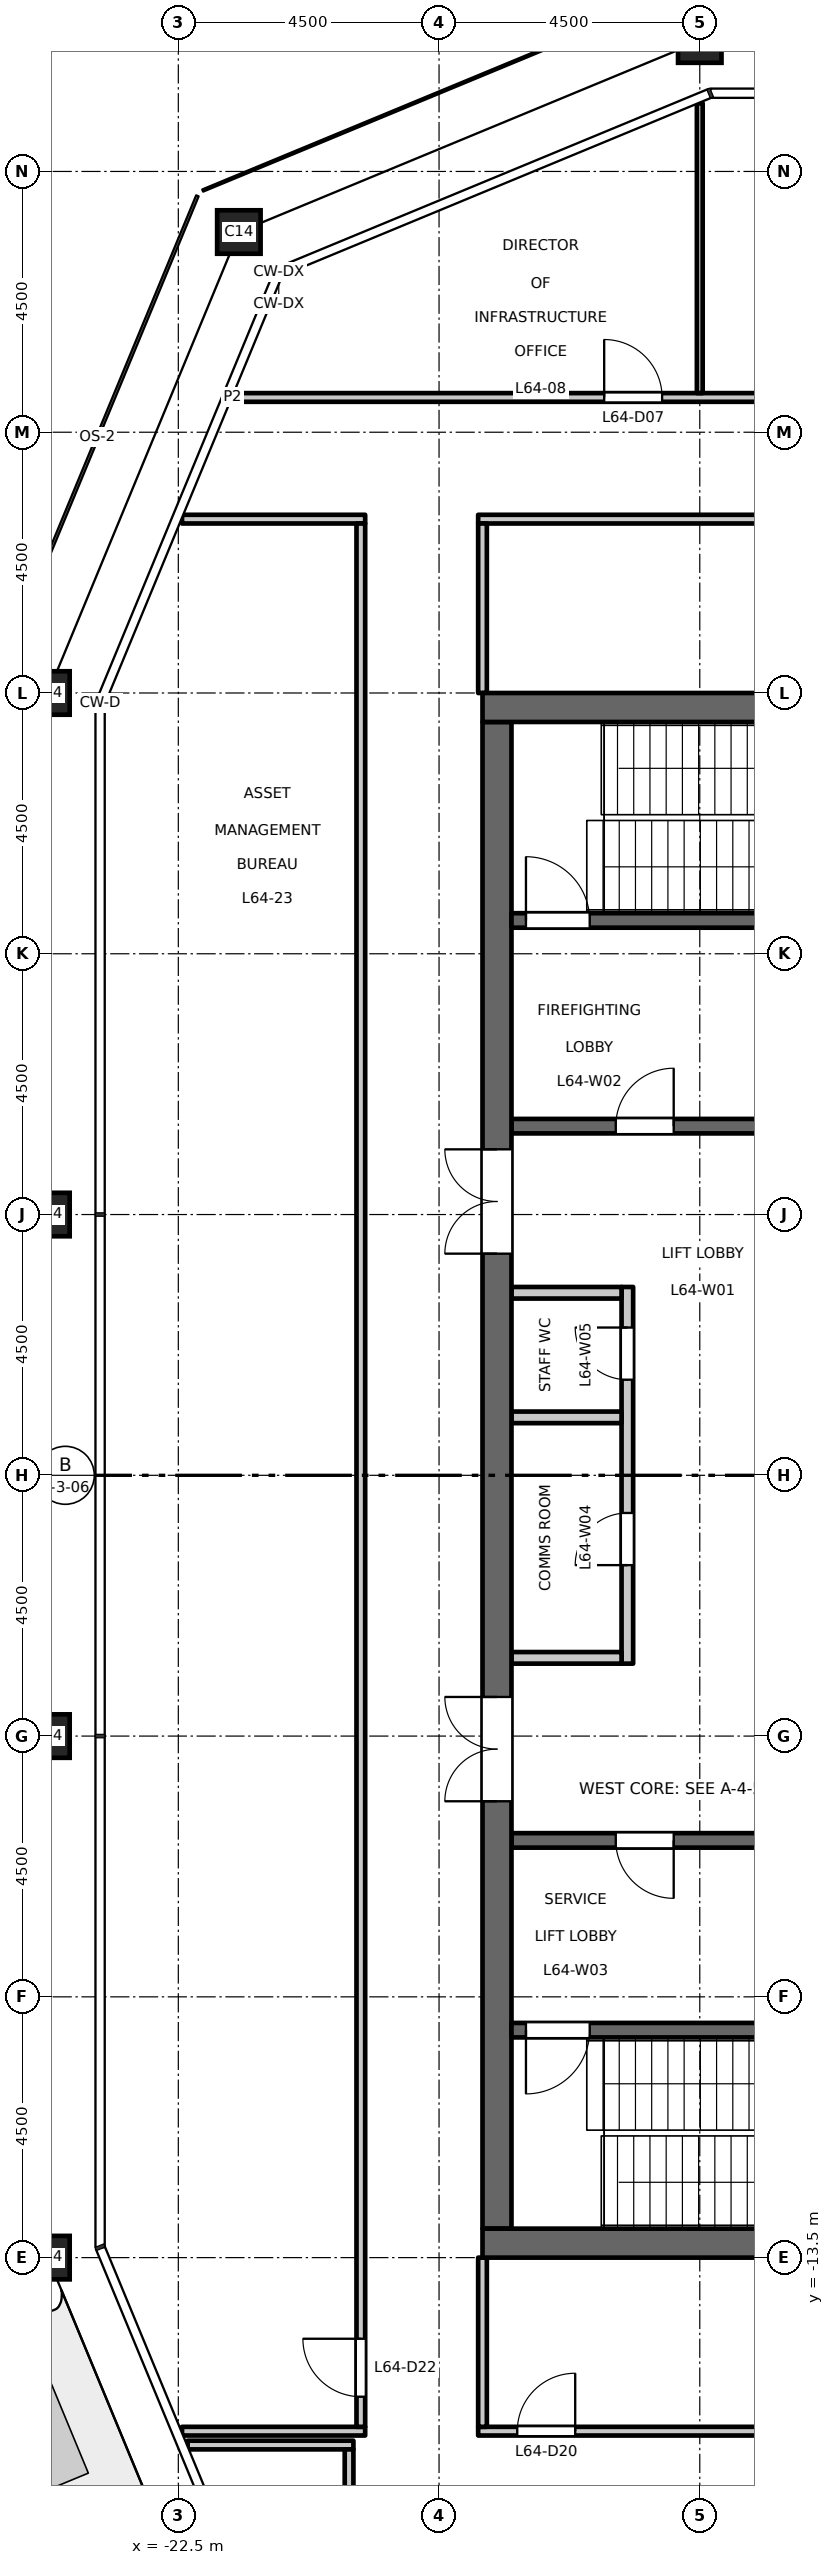
"""IFC4 building model, lengths in metres.
Left out: names, types, materials, properties, quantities, classifications, styles, units other than length and angle.
Written with IfcOpenShell. Run it as: python <this file> out.ifc"""

import sys

from ifc_helpers import new_model, si_unit, direction, frame, frame_2d, origin, origin_2d, place, context, subcontext, project, spatial, rectangle, hollow_rectangle, extrude, element, fill, save


model = new_model("IFC4")
c1 = context("Model", 3, precision=1e-05, world=origin(), true_north=direction((0.0, 1.0)))
c2 = subcontext(c1, "Body", "Model", "MODEL_VIEW")
j1 = project(units=[si_unit("LENGTHUNIT", "METRE"), si_unit("PLANEANGLEUNIT", "RADIAN")], contexts=[c1])
p1 = place(None, origin())
s1 = spatial("IfcSite", under=j1, at=p1, CompositionType="ELEMENT")
p2 = place(p1, origin())
s2 = spatial("IfcBuilding", under=s1, at=p2, CompositionType="ELEMENT")
p3 = place(p2, frame((0.0, 0.0, 298.7)))
s3 = spatial("IfcBuildingStorey", under=s2, at=p3, CompositionType="ELEMENT", Elevation=298.7)
for number, where, z_axis, x_axis in (
    (1, (-13.5, 24.75, 0.0), (0.0, 0.0, 1.0), (1.0, 0.0, 0.0)),
    (2, (-21.455, 21.455, 0.0), (0.0, 0.0, 1.0), (1.0, 0.0, 0.0)),
    (3, (-24.75, 13.5, 0.0), (0.0, 0.0, 1.0), (1.0, 0.0, 0.0)),
    (4, (-24.75, 4.5, 0.0), (0.0, 0.0, 1.0), (1.0, 0.0, 0.0)),
    (5, (-24.75, -4.5, 0.0), (0.0, 0.0, 1.0), (1.0, 0.0, 0.0)),
    (6, (-24.75, -13.5, 0.0), (0.0, 0.0, 1.0), (1.0, 0.0, 0.0)),
):
    element("IfcColumn", number, at=place(p3, frame(where, z_axis=z_axis, x_axis=x_axis)), inside=s3, PredefinedType="COLUMN", context=c2, shape_type="SweptSolid", body=[
        extrude(hollow_rectangle(XDim=0.75, YDim=0.75, WallThickness=0.04, at=origin_2d()), origin(), (0.0, 0.0, 1.0), 4.5),
    ])
p4 = place(p3, frame((-14.75, -3.25, 0.0), z_axis=(0.0, 0.0, 1.0), x_axis=(0.0, 1.0, 0.0)))
e7 = element("IfcWall", 7, at=p4, inside=s3, PredefinedType="PARTITIONING", context=c2, shape_type="SweptSolid", body=[
    extrude(rectangle(XDim=6.5, YDim=0.2, at=frame_2d((3.25, 0.0))), origin(), (0.0, 0.0, 1.0), 4.35),
])
p5 = place(p4, frame((1.7, 0.0, 0.0)))
e8 = element("IfcOpeningElement", 8, at=p5, cuts=e7, PredefinedType="OPENING", context=c2, shape_type="SweptSolid", body=[
    extrude(rectangle(XDim=0.9, YDim=2.1, at=frame_2d((0.45, 1.05))), frame((0.0, 0.11, 0.0), z_axis=(0.0, -1.0, 0.0), x_axis=(1.0, 0.0, 0.0)), (0.0, 0.0, 1.0), 0.22),
])
p6 = place(p4, frame((4.9, 0.0, 0.0)))
e9 = element("IfcOpeningElement", 9, at=p6, cuts=e7, PredefinedType="OPENING", context=c2, shape_type="SweptSolid", body=[
    extrude(rectangle(XDim=0.9, YDim=2.1, at=frame_2d((0.45, 1.05))), frame((0.0, 0.11, 0.0), z_axis=(0.0, -1.0, 0.0), x_axis=(1.0, 0.0, 0.0)), (0.0, 0.0, 1.0), 0.22),
])
for number, where, z_axis, x_axis in (
    (10, (-14.85, 3.15, 0.0), (0.0, 0.0, 1.0), (-1.0, 0.0, 0.0)),
    (11, (-14.85, -3.15, 0.0), (0.0, 0.0, 1.0), (-1.0, 0.0, 0.0)),
    (12, (-14.85, 1.0, 0.0), (0.0, 0.0, 1.0), (-1.0, 0.0, 0.0)),
):
    element("IfcWall", number, at=place(p3, frame(where, z_axis=z_axis, x_axis=x_axis)), inside=s3, PredefinedType="PARTITIONING", context=c2, shape_type="SweptSolid", body=[
        extrude(rectangle(XDim=1.9, YDim=0.2, at=frame_2d((0.95, 0.0))), origin(), (0.0, 0.0, 1.0), 4.35),
    ])
p7 = place(p3, frame((-12.15, 6.025, 0.0), z_axis=(0.0, 0.0, 1.0), x_axis=(-1.0, 0.0, 0.0)))
e13 = element("IfcWall", 13, at=p7, inside=s3, PredefinedType="SHEAR", context=c2, shape_type="SweptSolid", body=[
    extrude(rectangle(XDim=4.6, YDim=0.25, at=frame_2d((2.3, 0.0))), origin(), (0.0, 0.0, 1.0), 4.35),
])
p8 = place(p7, frame((1.8, 0.0, 0.0)))
e14 = element("IfcOpeningElement", 14, at=p8, cuts=e13, PredefinedType="OPENING", context=c2, shape_type="SweptSolid", body=[
    extrude(rectangle(XDim=1.0, YDim=2.1, at=frame_2d((0.5, 1.05))), frame((0.0, 0.135, 0.0), z_axis=(0.0, -1.0, 0.0), x_axis=(1.0, 0.0, 0.0)), (0.0, 0.0, 1.0), 0.27),
])
p9 = place(p3, frame((-12.15, -6.3, 0.0), z_axis=(0.0, 0.0, 1.0), x_axis=(-1.0, 0.0, 0.0)))
e15 = element("IfcWall", 15, at=p9, inside=s3, PredefinedType="SHEAR", context=c2, shape_type="SweptSolid", body=[
    extrude(rectangle(XDim=4.6, YDim=0.25, at=frame_2d((2.3, 0.0))), origin(), (0.0, 0.0, 1.0), 4.35),
])
p10 = place(p9, frame((1.8, 0.0, 0.0)))
e16 = element("IfcOpeningElement", 16, at=p10, cuts=e15, PredefinedType="OPENING", context=c2, shape_type="SweptSolid", body=[
    extrude(rectangle(XDim=1.0, YDim=2.1, at=frame_2d((0.5, 1.05))), frame((0.0, 0.135, 0.0), z_axis=(0.0, -1.0, 0.0), x_axis=(1.0, 0.0, 0.0)), (0.0, 0.0, 1.0), 0.27),
])
p11 = place(p3, frame((-17.0, -13.0, 0.0), z_axis=(0.0, 0.0, 1.0), x_axis=(0.0, 1.0, 0.0)))
e17 = element("IfcWall", 17, at=p11, inside=s3, PredefinedType="SHEAR", context=c2, shape_type="SweptSolid", body=[
    extrude(rectangle(XDim=26.0, YDim=0.5, at=frame_2d((13.0, 0.0))), origin(), (0.0, 0.0, 1.0), 4.35),
])
p12 = place(p11, frame((16.825, 0.0, 0.0)))
e18 = element("IfcOpeningElement", 18, at=p12, cuts=e17, PredefinedType="OPENING", context=c2, shape_type="SweptSolid", body=[
    extrude(rectangle(XDim=1.8, YDim=2.1, at=frame_2d((0.9, 1.05))), frame((0.0, 0.26, 0.0), z_axis=(0.0, -1.0, 0.0), x_axis=(1.0, 0.0, 0.0)), (0.0, 0.0, 1.0), 0.52),
])
p13 = place(p11, frame((7.375, 0.0, 0.0)))
e19 = element("IfcOpeningElement", 19, at=p13, cuts=e17, PredefinedType="OPENING", context=c2, shape_type="SweptSolid", body=[
    extrude(rectangle(XDim=1.8, YDim=2.1, at=frame_2d((0.9, 1.05))), frame((0.0, 0.26, 0.0), z_axis=(0.0, -1.0, 0.0), x_axis=(1.0, 0.0, 0.0)), (0.0, 0.0, 1.0), 0.52),
])
p14 = place(p3, frame((-8.75, 9.575, 0.0), z_axis=(0.0, 0.0, 1.0), x_axis=(-1.0, 0.0, 0.0)))
e20 = element("IfcWall", 20, at=p14, inside=s3, PredefinedType="SHEAR", context=c2, shape_type="SweptSolid", body=[
    extrude(rectangle(XDim=8.0, YDim=0.25, at=frame_2d((4.0, 0.0))), origin(), (0.0, 0.0, 1.0), 4.35),
])
p15 = place(p14, frame((6.65, 0.0, 0.0)))
e21 = element("IfcOpeningElement", 21, at=p15, cuts=e20, PredefinedType="OPENING", context=c2, shape_type="SweptSolid", body=[
    extrude(rectangle(XDim=1.1, YDim=2.1, at=frame_2d((0.55, 1.05))), frame((0.0, 0.135, 0.0), z_axis=(0.0, -1.0, 0.0), x_axis=(1.0, 0.0, 0.0)), (0.0, 0.0, 1.0), 0.27),
])
p16 = place(p3, frame((-8.75, -9.575, 0.0), z_axis=(0.0, 0.0, 1.0), x_axis=(-1.0, 0.0, 0.0)))
e22 = element("IfcWall", 22, at=p16, inside=s3, PredefinedType="SHEAR", context=c2, shape_type="SweptSolid", body=[
    extrude(rectangle(XDim=8.0, YDim=0.25, at=frame_2d((4.0, 0.0))), origin(), (0.0, 0.0, 1.0), 4.35),
])
p17 = place(p16, frame((6.65, 0.0, 0.0)))
e23 = element("IfcOpeningElement", 23, at=p17, cuts=e22, PredefinedType="OPENING", context=c2, shape_type="SweptSolid", body=[
    extrude(rectangle(XDim=1.1, YDim=2.1, at=frame_2d((0.55, 1.05))), frame((0.0, 0.135, 0.0), z_axis=(0.0, -1.0, 0.0), x_axis=(1.0, 0.0, 0.0)), (0.0, 0.0, 1.0), 0.27),
])
for number, where, z_axis, x_axis in (
    (24, (-8.25, 13.25, 0.0), (0.0, 0.0, 1.0), (-1.0, 0.0, 0.0)),
    (25, (-8.25, -13.25, 0.0), (0.0, 0.0, 1.0), (-1.0, 0.0, 0.0)),
):
    element("IfcWall", number, at=place(p3, frame(where, z_axis=z_axis, x_axis=x_axis)), inside=s3, PredefinedType="SHEAR", context=c2, shape_type="SweptSolid", body=[
        extrude(rectangle(XDim=9.0, YDim=0.5, at=frame_2d((4.5, 0.0))), origin(), (0.0, 0.0, 1.0), 4.35),
    ])
p18 = place(p3, frame((-22.339, -16.734, 0.0), z_axis=(0.0, 0.0, 1.0), x_axis=(1.0, 0.0, 0.0)))
e26 = element("IfcWall", 26, at=p18, inside=s3, PredefinedType="PARTITIONING", context=c2, shape_type="SweptSolid", body=[
    extrude(rectangle(XDim=2.861, YDim=0.15, at=frame_2d((1.431, 0.0))), origin(), (0.0, 0.0, 1.0), 4.35),
])
p19 = place(p3, frame((-22.436, -16.495, 0.0), z_axis=(0.0, 0.0, 1.0), x_axis=(1.0, 0.0, 0.0)))
e27 = element("IfcWall", 27, at=p19, inside=s3, PredefinedType="PARTITIONING", context=c2, shape_type="SweptSolid", body=[
    extrude(rectangle(XDim=3.161, YDim=0.15, at=frame_2d((1.581, 0.0))), origin(), (0.0, 0.0, 1.0), 4.35),
])
p20 = place(p3, frame((-17.325, -16.495, 0.0), z_axis=(0.0, 0.0, 1.0), x_axis=(1.0, 0.0, 0.0)))
e28 = element("IfcWall", 28, at=p20, inside=s3, PredefinedType="PARTITIONING", context=c2, shape_type="SweptSolid", body=[
    extrude(rectangle(XDim=34.65, YDim=0.15, at=frame_2d((17.325, 0.0))), origin(), (0.0, 0.0, 1.0), 4.35),
])
p21 = place(p20, frame((9.675, 0.0, 0.0)))
e29 = element("IfcOpeningElement", 29, at=p21, cuts=e28, PredefinedType="OPENING", context=c2, shape_type="SweptSolid", body=[
    extrude(rectangle(XDim=1.0, YDim=2.1, at=frame_2d((0.5, 1.05))), frame((0.0, 0.085, 0.0), z_axis=(0.0, -1.0, 0.0), x_axis=(1.0, 0.0, 0.0)), (0.0, 0.0, 1.0), 0.17),
])
p22 = place(p20, frame((23.925, 0.0, 0.0)))
e30 = element("IfcOpeningElement", 30, at=p22, cuts=e28, PredefinedType="OPENING", context=c2, shape_type="SweptSolid", body=[
    extrude(rectangle(XDim=1.0, YDim=2.1, at=frame_2d((0.5, 1.05))), frame((0.0, 0.085, 0.0), z_axis=(0.0, -1.0, 0.0), x_axis=(1.0, 0.0, 0.0)), (0.0, 0.0, 1.0), 0.17),
])
p23 = place(p20, frame((0.675, 0.0, 0.0)))
e31 = element("IfcOpeningElement", 31, at=p23, cuts=e28, PredefinedType="OPENING", context=c2, shape_type="SweptSolid", body=[
    extrude(rectangle(XDim=1.0, YDim=2.1, at=frame_2d((0.5, 1.05))), frame((0.0, 0.085, 0.0), z_axis=(0.0, -1.0, 0.0), x_axis=(1.0, 0.0, 0.0)), (0.0, 0.0, 1.0), 0.17),
])
p24 = place(p20, frame((32.925, 0.0, 0.0)))
e32 = element("IfcOpeningElement", 32, at=p24, cuts=e28, PredefinedType="OPENING", context=c2, shape_type="SweptSolid", body=[
    extrude(rectangle(XDim=1.0, YDim=2.1, at=frame_2d((0.5, 1.05))), frame((0.0, 0.085, 0.0), z_axis=(0.0, -1.0, 0.0), x_axis=(1.0, 0.0, 0.0)), (0.0, 0.0, 1.0), 0.17),
])
p25 = place(p3, frame((-22.436, 16.5, 0.0), z_axis=(0.0, 0.0, 1.0), x_axis=(1.0, 0.0, 0.0)))
e33 = element("IfcWall", 33, at=p25, inside=s3, PredefinedType="PARTITIONING", context=c2, shape_type="SweptSolid", body=[
    extrude(rectangle(XDim=3.161, YDim=0.15, at=frame_2d((1.581, 0.0))), origin(), (0.0, 0.0, 1.0), 4.35),
])
p26 = place(p3, frame((-17.325, 16.5, 0.0), z_axis=(0.0, 0.0, 1.0), x_axis=(1.0, 0.0, 0.0)))
e34 = element("IfcWall", 34, at=p26, inside=s3, PredefinedType="PARTITIONING", context=c2, shape_type="SweptSolid", body=[
    extrude(rectangle(XDim=34.65, YDim=0.15, at=frame_2d((17.325, 0.0))), origin(), (0.0, 0.0, 1.0), 4.35),
])
p27 = place(p26, frame((9.725, 0.0, 0.0)))
e35 = element("IfcOpeningElement", 35, at=p27, cuts=e34, PredefinedType="OPENING", context=c2, shape_type="SweptSolid", body=[
    extrude(rectangle(XDim=1.0, YDim=2.1, at=frame_2d((0.5, 1.05))), frame((0.0, 0.085, 0.0), z_axis=(0.0, -1.0, 0.0), x_axis=(1.0, 0.0, 0.0)), (0.0, 0.0, 1.0), 0.17),
])
p28 = place(p26, frame((7.475, 0.0, 0.0)))
e36 = element("IfcOpeningElement", 36, at=p28, cuts=e34, PredefinedType="OPENING", context=c2, shape_type="SweptSolid", body=[
    extrude(rectangle(XDim=1.0, YDim=2.1, at=frame_2d((0.5, 1.05))), frame((0.0, 0.085, 0.0), z_axis=(0.0, -1.0, 0.0), x_axis=(1.0, 0.0, 0.0)), (0.0, 0.0, 1.0), 0.17),
])
p29 = place(p26, frame((26.225, 0.0, 0.0)))
e37 = element("IfcOpeningElement", 37, at=p29, cuts=e34, PredefinedType="OPENING", context=c2, shape_type="SweptSolid", body=[
    extrude(rectangle(XDim=1.0, YDim=2.1, at=frame_2d((0.5, 1.05))), frame((0.0, 0.085, 0.0), z_axis=(0.0, -1.0, 0.0), x_axis=(1.0, 0.0, 0.0)), (0.0, 0.0, 1.0), 0.17),
])
p30 = place(p3, frame((-21.566, 18.6, 0.0), z_axis=(0.0, 0.0, 1.0), x_axis=(1.0, 0.0, 0.0)))
e38 = element("IfcWall", 38, at=p30, inside=s3, PredefinedType="PARTITIONING", context=c2, shape_type="SweptSolid", body=[
    extrude(rectangle(XDim=43.132, YDim=0.15, at=frame_2d((21.566, 0.0))), origin(), (0.0, 0.0, 1.0), 4.35),
])
p31 = place(p30, frame((15.416, 0.0, 0.0)))
e39 = element("IfcOpeningElement", 39, at=p31, cuts=e38, PredefinedType="OPENING", context=c2, shape_type="SweptSolid", body=[
    extrude(rectangle(XDim=1.0, YDim=2.1, at=frame_2d((0.5, 1.05))), frame((0.0, 0.085, 0.0), z_axis=(0.0, -1.0, 0.0), x_axis=(1.0, 0.0, 0.0)), (0.0, 0.0, 1.0), 0.17),
])
p32 = place(p30, frame((17.666, 0.0, 0.0)))
e40 = element("IfcOpeningElement", 40, at=p32, cuts=e38, PredefinedType="OPENING", context=c2, shape_type="SweptSolid", body=[
    extrude(rectangle(XDim=1.0, YDim=2.1, at=frame_2d((0.5, 1.05))), frame((0.0, 0.085, 0.0), z_axis=(0.0, -1.0, 0.0), x_axis=(1.0, 0.0, 0.0)), (0.0, 0.0, 1.0), 0.17),
])
p33 = place(p30, frame((33.416, 0.0, 0.0)))
e41 = element("IfcOpeningElement", 41, at=p33, cuts=e38, PredefinedType="OPENING", context=c2, shape_type="SweptSolid", body=[
    extrude(rectangle(XDim=1.0, YDim=2.1, at=frame_2d((0.5, 1.05))), frame((0.0, 0.085, 0.0), z_axis=(0.0, -1.0, 0.0), x_axis=(1.0, 0.0, 0.0)), (0.0, 0.0, 1.0), 0.17),
])
p34 = place(p30, frame((6.416, 0.0, 0.0)))
e42 = element("IfcOpeningElement", 42, at=p34, cuts=e38, PredefinedType="OPENING", context=c2, shape_type="SweptSolid", body=[
    extrude(rectangle(XDim=1.0, YDim=2.1, at=frame_2d((0.5, 1.05))), frame((0.0, 0.085, 0.0), z_axis=(0.0, -1.0, 0.0), x_axis=(1.0, 0.0, 0.0)), (0.0, 0.0, 1.0), 0.17),
])
p35 = place(p30, frame((35.732, 0.0, 0.0)))
e43 = element("IfcOpeningElement", 43, at=p35, cuts=e38, PredefinedType="OPENING", context=c2, shape_type="SweptSolid", body=[
    extrude(rectangle(XDim=1.0, YDim=2.1, at=frame_2d((0.5, 1.05))), frame((0.0, 0.085, 0.0), z_axis=(0.0, -1.0, 0.0), x_axis=(1.0, 0.0, 0.0)), (0.0, 0.0, 1.0), 0.17),
])
p36 = place(p3, frame((-19.553, -18.525, 0.0), z_axis=(0.0, 0.0, 1.0), x_axis=(0.0, 1.0, 0.0)))
e44 = element("IfcWall", 44, at=p36, inside=s3, PredefinedType="PARTITIONING", context=c2, shape_type="SweptSolid", body=[
    extrude(rectangle(XDim=1.716, YDim=0.15, at=frame_2d((0.858, 0.0))), origin(), (0.0, 0.0, 1.0), 4.35),
])
p37 = place(p3, frame((-19.35, -16.42, 0.0), z_axis=(0.0, 0.0, 1.0), x_axis=(0.0, 1.0, 0.0)))
e45 = element("IfcWall", 45, at=p37, inside=s3, PredefinedType="PARTITIONING", context=c2, shape_type="SweptSolid", body=[
    extrude(rectangle(XDim=32.845, YDim=0.15, at=frame_2d((16.422, 0.0))), origin(), (0.0, 0.0, 1.0), 4.35),
])
p38 = place(p37, frame((0.52, 0.0, 0.0)))
e46 = element("IfcOpeningElement", 46, at=p38, cuts=e45, PredefinedType="OPENING", context=c2, shape_type="SweptSolid", body=[
    extrude(rectangle(XDim=1.0, YDim=2.1, at=frame_2d((0.5, 1.05))), frame((0.0, 0.085, 0.0), z_axis=(0.0, -1.0, 0.0), x_axis=(1.0, 0.0, 0.0)), (0.0, 0.0, 1.0), 0.17),
])
p39 = place(p3, frame((-17.25, -16.42, 0.0), z_axis=(0.0, 0.0, 1.0), x_axis=(0.0, 1.0, 0.0)))
e47 = element("IfcWall", 47, at=p39, inside=s3, PredefinedType="PARTITIONING", context=c2, shape_type="SweptSolid", body=[
    extrude(rectangle(XDim=2.92, YDim=0.15, at=frame_2d((1.46, 0.0))), origin(), (0.0, 0.0, 1.0), 4.35),
])
p40 = place(p3, frame((-17.25, 13.5, 0.0), z_axis=(0.0, 0.0, 1.0), x_axis=(0.0, 1.0, 0.0)))
e48 = element("IfcWall", 48, at=p40, inside=s3, PredefinedType="PARTITIONING", context=c2, shape_type="SweptSolid", body=[
    extrude(rectangle(XDim=2.925, YDim=0.15, at=frame_2d((1.462, 0.0))), origin(), (0.0, 0.0, 1.0), 4.35),
])
p41 = place(p3, frame((-13.5, 18.675, 0.0), z_axis=(0.0, 0.0, 1.0), x_axis=(0.0, 1.0, 0.0)))
e49 = element("IfcWall", 49, at=p41, inside=s3, PredefinedType="PARTITIONING", context=c2, shape_type="SweptSolid", body=[
    extrude(rectangle(XDim=5.003, YDim=0.1, at=frame_2d((2.501, 0.0))), origin(), (0.0, 0.0, 1.0), 3.75),
])
p42 = place(p8, origin())
e50 = element("IfcDoor", 50, at=p42, inside=s3, OperationType="SINGLE_SWING_LEFT", PredefinedType="DOOR", context=c2, shape_type="SweptSolid", body=[
    extrude(rectangle(XDim=1.0, YDim=2.1, at=frame_2d((0.5, 1.05))), frame((0.0, 0.025, 0.0), z_axis=(0.0, -1.0, 0.0), x_axis=(1.0, 0.0, 0.0)), (0.0, 0.0, 1.0), 0.05),
])
fill(e14, e50)
p43 = place(p10, origin())
e51 = element("IfcDoor", 51, at=p43, inside=s3, OperationType="SINGLE_SWING_RIGHT", PredefinedType="DOOR", context=c2, shape_type="SweptSolid", body=[
    extrude(rectangle(XDim=1.0, YDim=2.1, at=frame_2d((0.5, 1.05))), frame((0.0, 0.025, 0.0), z_axis=(0.0, -1.0, 0.0), x_axis=(1.0, 0.0, 0.0)), (0.0, 0.0, 1.0), 0.05),
])
fill(e16, e51)
p44 = place(p15, origin())
e52 = element("IfcDoor", 52, at=p44, inside=s3, OperationType="SINGLE_SWING_RIGHT", PredefinedType="DOOR", context=c2, shape_type="SweptSolid", body=[
    extrude(rectangle(XDim=1.1, YDim=2.1, at=frame_2d((0.55, 1.05))), frame((0.0, 0.025, 0.0), z_axis=(0.0, -1.0, 0.0), x_axis=(1.0, 0.0, 0.0)), (0.0, 0.0, 1.0), 0.05),
])
fill(e21, e52)
p45 = place(p17, origin())
e53 = element("IfcDoor", 53, at=p45, inside=s3, OperationType="SINGLE_SWING_LEFT", PredefinedType="DOOR", context=c2, shape_type="SweptSolid", body=[
    extrude(rectangle(XDim=1.1, YDim=2.1, at=frame_2d((0.55, 1.05))), frame((0.0, 0.025, 0.0), z_axis=(0.0, -1.0, 0.0), x_axis=(1.0, 0.0, 0.0)), (0.0, 0.0, 1.0), 0.05),
])
fill(e23, e53)
p46 = place(p12, origin())
e54 = element("IfcDoor", 54, at=p46, inside=s3, OperationType="DOUBLE_DOOR_DOUBLE_SWING", PredefinedType="DOOR", context=c2, shape_type="SweptSolid", body=[
    extrude(rectangle(XDim=1.8, YDim=2.1, at=frame_2d((0.9, 1.05))), frame((0.0, 0.025, 0.0), z_axis=(0.0, -1.0, 0.0), x_axis=(1.0, 0.0, 0.0)), (0.0, 0.0, 1.0), 0.05),
])
fill(e18, e54)
p47 = place(p13, origin())
e55 = element("IfcDoor", 55, at=p47, inside=s3, OperationType="DOUBLE_DOOR_DOUBLE_SWING", PredefinedType="DOOR", context=c2, shape_type="SweptSolid", body=[
    extrude(rectangle(XDim=1.8, YDim=2.1, at=frame_2d((0.9, 1.05))), frame((0.0, 0.025, 0.0), z_axis=(0.0, -1.0, 0.0), x_axis=(1.0, 0.0, 0.0)), (0.0, 0.0, 1.0), 0.05),
])
fill(e19, e55)
p48 = place(p5, origin())
e56 = element("IfcDoor", 56, at=p48, inside=s3, OperationType="SINGLE_SWING_RIGHT", PredefinedType="DOOR", context=c2, shape_type="SweptSolid", body=[
    extrude(rectangle(XDim=0.9, YDim=2.1, at=frame_2d((0.45, 1.05))), frame((0.0, 0.025, 0.0), z_axis=(0.0, -1.0, 0.0), x_axis=(1.0, 0.0, 0.0)), (0.0, 0.0, 1.0), 0.05),
])
fill(e8, e56)
p49 = place(p6, origin())
e57 = element("IfcDoor", 57, at=p49, inside=s3, OperationType="SINGLE_SWING_LEFT", PredefinedType="DOOR", context=c2, shape_type="SweptSolid", body=[
    extrude(rectangle(XDim=0.9, YDim=2.1, at=frame_2d((0.45, 1.05))), frame((0.0, 0.025, 0.0), z_axis=(0.0, -1.0, 0.0), x_axis=(1.0, 0.0, 0.0)), (0.0, 0.0, 1.0), 0.05),
])
fill(e9, e57)
p50 = place(p34, origin())
e58 = element("IfcDoor", 58, at=p50, inside=s3, OperationType="SINGLE_SWING_LEFT", PredefinedType="DOOR", context=c2, shape_type="SweptSolid", body=[
    extrude(rectangle(XDim=1.0, YDim=2.1, at=frame_2d((0.5, 1.05))), frame((0.0, 0.025, 0.0), z_axis=(0.0, -1.0, 0.0), x_axis=(1.0, 0.0, 0.0)), (0.0, 0.0, 1.0), 0.05),
])
fill(e42, e58)
p51 = place(p23, origin())
e59 = element("IfcDoor", 59, at=p51, inside=s3, OperationType="SINGLE_SWING_RIGHT", PredefinedType="DOOR", context=c2, shape_type="SweptSolid", body=[
    extrude(rectangle(XDim=1.0, YDim=2.1, at=frame_2d((0.5, 1.05))), frame((0.0, 0.025, 0.0), z_axis=(0.0, -1.0, 0.0), x_axis=(1.0, 0.0, 0.0)), (0.0, 0.0, 1.0), 0.05),
])
fill(e31, e59)
p52 = place(p38, origin())
e60 = element("IfcDoor", 60, at=p52, inside=s3, OperationType="SINGLE_SWING_RIGHT", PredefinedType="DOOR", context=c2, shape_type="SweptSolid", body=[
    extrude(rectangle(XDim=1.0, YDim=2.1, at=frame_2d((0.5, 1.05))), frame((0.0, 0.025, 0.0), z_axis=(0.0, -1.0, 0.0), x_axis=(1.0, 0.0, 0.0)), (0.0, 0.0, 1.0), 0.05),
])
fill(e46, e60)
save(model, sys.argv[1])
